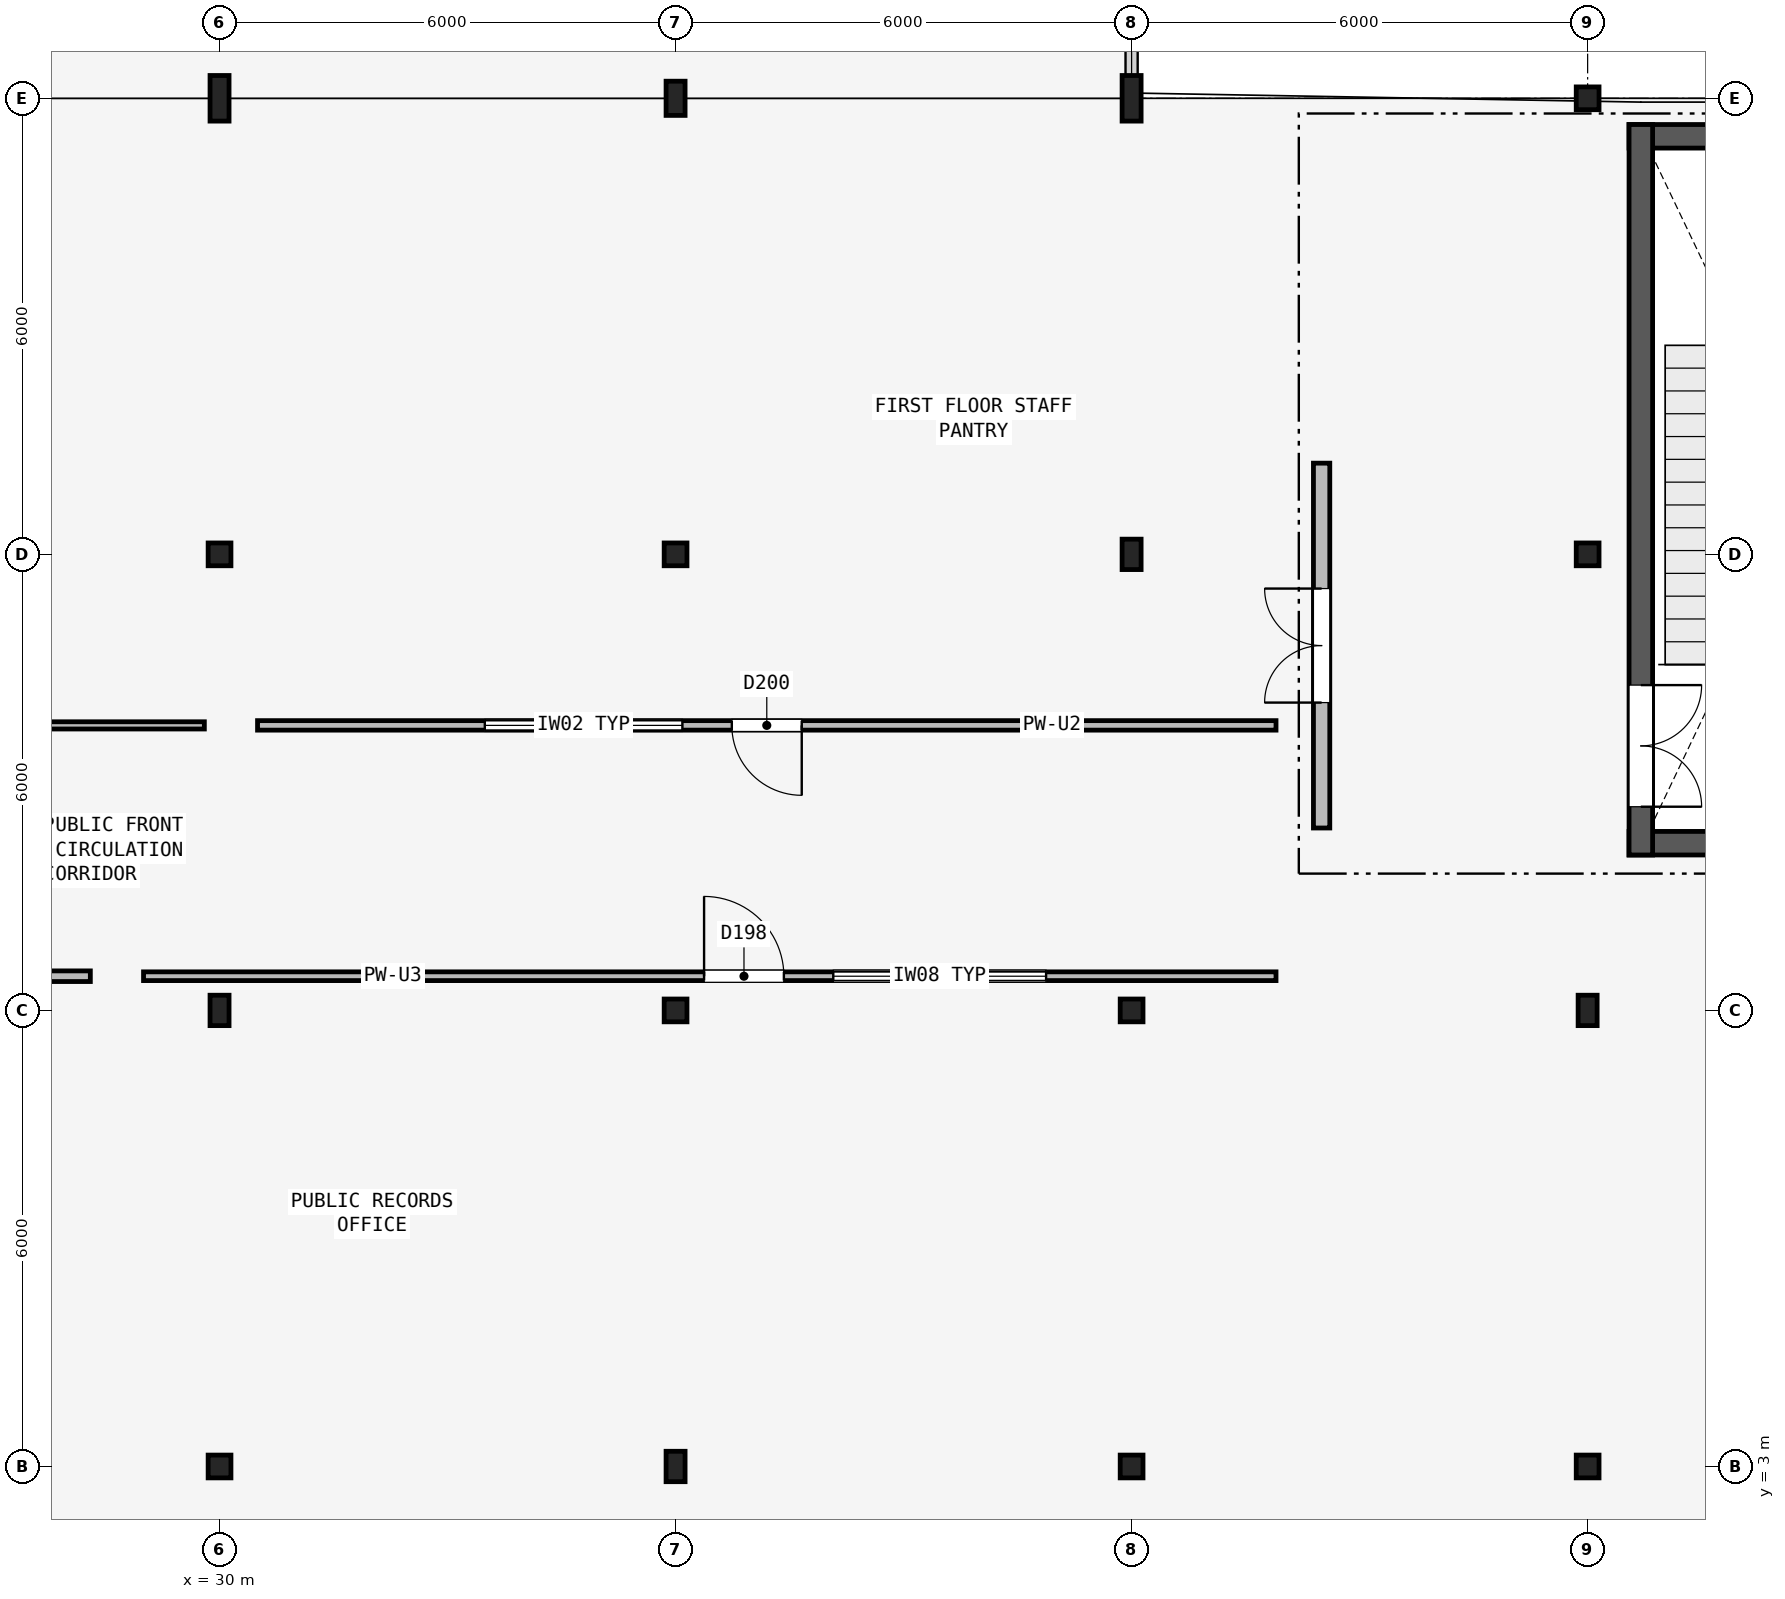
"""IFC4 building model, lengths in metres.
Left out: names, types, materials, properties, quantities, classifications, styles, units other than length and angle.
Written with IfcOpenShell. Run it as: python <this file> out.ifc"""

import sys

from ifc_helpers import new_model, si_unit, direction, frame, frame_2d, origin, origin_2d, place, context, subcontext, project, spatial, rectangle, hollow_rectangle, i_section, extrude, element, fill, save


model = new_model("IFC4")
c1 = context("Model", 3, precision=1e-05, world=origin(), true_north=direction((0.0, 1.0)))
c2 = subcontext(c1, "Body", "Model", "MODEL_VIEW")
j1 = project(units=[si_unit("LENGTHUNIT", "METRE"), si_unit("PLANEANGLEUNIT", "RADIAN")], contexts=[c1])
p1 = place(None, origin())
s1 = spatial("IfcSite", under=j1, at=p1, CompositionType="ELEMENT")
p2 = place(p1, origin())
s2 = spatial("IfcBuilding", under=s1, at=p2, CompositionType="ELEMENT")
p3 = place(p2, frame((0.0, 0.0, 4.8)))
s3 = spatial("IfcBuildingStorey", under=s2, at=p3, CompositionType="ELEMENT", Elevation=4.8)
p4 = place(p3, frame((30.0, 3.0, 0.0), z_axis=(0.0, 0.0, 1.0), x_axis=(1.0, 0.0, 0.0)))
e1 = element("IfcColumn", 1, at=p4, inside=s3, PredefinedType="COLUMN", context=c2, shape_type="SweptSolid", body=[
    extrude(hollow_rectangle(XDim=0.3, YDim=0.3, WallThickness=0.016, InnerFilletRadius=0.016, OuterFilletRadius=0.032, at=origin_2d()), origin(), (0.0, 0.0, 1.0), 4.5),
])
p5 = place(p3, frame((30.0, 9.0, 0.0), z_axis=(0.0, 0.0, 1.0), x_axis=(1.0, 0.0, 0.0)))
e2 = element("IfcColumn", 2, at=p5, inside=s3, PredefinedType="COLUMN", context=c2, shape_type="SweptSolid", body=[
    extrude(i_section(OverallWidth=0.25, OverallDepth=0.4, WebThickness=0.01, FlangeThickness=0.013, FilletRadius=0.014, at=origin_2d()), origin(), (0.0, 0.0, 1.0), 4.5),
])
p6 = place(p3, frame((30.0, 15.0, 0.0), z_axis=(0.0, 0.0, 1.0), x_axis=(1.0, 0.0, 0.0)))
e3 = element("IfcColumn", 3, at=p6, inside=s3, PredefinedType="COLUMN", context=c2, shape_type="SweptSolid", body=[
    extrude(hollow_rectangle(XDim=0.3, YDim=0.3, WallThickness=0.016, InnerFilletRadius=0.016, OuterFilletRadius=0.032, at=origin_2d()), origin(), (0.0, 0.0, 1.0), 4.5),
])
p7 = place(p3, frame((30.0, 21.0, 0.0), z_axis=(0.0, 0.0, 1.0), x_axis=(1.0, 0.0, 0.0)))
e4 = element("IfcColumn", 4, at=p7, inside=s3, PredefinedType="COLUMN", context=c2, shape_type="SweptSolid", body=[
    extrude(i_section(OverallWidth=0.25, OverallDepth=0.6, WebThickness=0.012, FlangeThickness=0.024, FilletRadius=0.017, at=origin_2d()), origin(), (0.0, 0.0, 1.0), 4.5),
])
p8 = place(p3, frame((36.0, 3.0, 0.0), z_axis=(0.0, 0.0, 1.0), x_axis=(1.0, 0.0, 0.0)))
e5 = element("IfcColumn", 5, at=p8, inside=s3, PredefinedType="COLUMN", context=c2, shape_type="SweptSolid", body=[
    extrude(i_section(OverallWidth=0.25, OverallDepth=0.4, WebThickness=0.01, FlangeThickness=0.013, FilletRadius=0.014, at=origin_2d()), origin(), (0.0, 0.0, 1.0), 4.5),
])
for number, where, z_axis, x_axis in (
    (6, (36.0, 9.0, 0.0), (0.0, 0.0, 1.0), (1.0, 0.0, 0.0)),
    (7, (36.0, 15.0, 0.0), (0.0, 0.0, 1.0), (1.0, 0.0, 0.0)),
):
    element("IfcColumn", number, at=place(p3, frame(where, z_axis=z_axis, x_axis=x_axis)), inside=s3, PredefinedType="COLUMN", context=c2, shape_type="SweptSolid", body=[
        extrude(hollow_rectangle(XDim=0.3, YDim=0.3, WallThickness=0.016, InnerFilletRadius=0.016, OuterFilletRadius=0.032, at=origin_2d()), origin(), (0.0, 0.0, 1.0), 4.5),
    ])
p9 = place(p3, frame((36.0, 21.0, 0.0), z_axis=(0.0, 0.0, 1.0), x_axis=(1.0, 0.0, 0.0)))
e8 = element("IfcColumn", 8, at=p9, inside=s3, PredefinedType="COLUMN", context=c2, shape_type="SweptSolid", body=[
    extrude(i_section(OverallWidth=0.25, OverallDepth=0.45, WebThickness=0.011, FlangeThickness=0.014, FilletRadius=0.015, at=origin_2d()), origin(), (0.0, 0.0, 1.0), 4.5),
])
for number, where, z_axis, x_axis in (
    (9, (42.0, 3.0, 0.0), (0.0, 0.0, 1.0), (1.0, 0.0, 0.0)),
    (10, (42.0, 9.0, 0.0), (0.0, 0.0, 1.0), (1.0, 0.0, 0.0)),
):
    element("IfcColumn", number, at=place(p3, frame(where, z_axis=z_axis, x_axis=x_axis)), inside=s3, PredefinedType="COLUMN", context=c2, shape_type="SweptSolid", body=[
        extrude(hollow_rectangle(XDim=0.3, YDim=0.3, WallThickness=0.016, InnerFilletRadius=0.016, OuterFilletRadius=0.032, at=origin_2d()), origin(), (0.0, 0.0, 1.0), 4.5),
    ])
p10 = place(p3, frame((42.0, 15.0, 0.0), z_axis=(0.0, 0.0, 1.0), x_axis=(1.0, 0.0, 0.0)))
e11 = element("IfcColumn", 11, at=p10, inside=s3, PredefinedType="COLUMN", context=c2, shape_type="SweptSolid", body=[
    extrude(i_section(OverallWidth=0.25, OverallDepth=0.4, WebThickness=0.01, FlangeThickness=0.013, FilletRadius=0.014, at=origin_2d()), origin(), (0.0, 0.0, 1.0), 4.5),
])
p11 = place(p3, frame((42.0, 21.0, 0.0), z_axis=(0.0, 0.0, 1.0), x_axis=(1.0, 0.0, 0.0)))
e12 = element("IfcColumn", 12, at=p11, inside=s3, PredefinedType="COLUMN", context=c2, shape_type="SweptSolid", body=[
    extrude(i_section(OverallWidth=0.25, OverallDepth=0.6, WebThickness=0.012, FlangeThickness=0.024, FilletRadius=0.017, at=origin_2d()), origin(), (0.0, 0.0, 1.0), 4.5),
])
p12 = place(p3, frame((48.0, 3.0, 0.0), z_axis=(0.0, 0.0, 1.0), x_axis=(1.0, 0.0, 0.0)))
e13 = element("IfcColumn", 13, at=p12, inside=s3, PredefinedType="COLUMN", context=c2, shape_type="SweptSolid", body=[
    extrude(hollow_rectangle(XDim=0.3, YDim=0.3, WallThickness=0.016, InnerFilletRadius=0.016, OuterFilletRadius=0.032, at=origin_2d()), origin(), (0.0, 0.0, 1.0), 4.5),
])
p13 = place(p3, frame((48.0, 9.0, 0.0), z_axis=(0.0, 0.0, 1.0), x_axis=(1.0, 0.0, 0.0)))
e14 = element("IfcColumn", 14, at=p13, inside=s3, PredefinedType="COLUMN", context=c2, shape_type="SweptSolid", body=[
    extrude(i_section(OverallWidth=0.25, OverallDepth=0.4, WebThickness=0.01, FlangeThickness=0.013, FilletRadius=0.014, at=origin_2d()), origin(), (0.0, 0.0, 1.0), 4.5),
])
for number, where, z_axis, x_axis in (
    (15, (48.0, 15.0, 0.0), (0.0, 0.0, 1.0), (1.0, 0.0, 0.0)),
    (16, (48.0, 21.0, 0.0), (0.0, 0.0, 1.0), (1.0, 0.0, 0.0)),
):
    element("IfcColumn", number, at=place(p3, frame(where, z_axis=z_axis, x_axis=x_axis)), inside=s3, PredefinedType="COLUMN", context=c2, shape_type="SweptSolid", body=[
        extrude(hollow_rectangle(XDim=0.3, YDim=0.3, WallThickness=0.016, InnerFilletRadius=0.016, OuterFilletRadius=0.032, at=origin_2d()), origin(), (0.0, 0.0, 1.0), 4.5),
    ])
p14 = place(p3, frame((49.329, 2.022, 0.0), z_axis=(0.0, 0.0, 1.0), x_axis=(0.960269600698, 0.279073993728, 0.0)))
e17 = element("IfcWall", 17, at=p14, inside=s3, PredefinedType="SOLIDWALL", context=c2, shape_type="SweptSolid", body=[
    extrude(rectangle(XDim=2.45, YDim=0.3, at=frame_2d((1.225, 0.0))), origin(), (0.0, 0.0, 1.0), 3.55),
])
for number, where, z_axis, x_axis in (
    (18, (48.545, 11.2, 0.0), (0.0, 0.0, 1.0), (1.0, 0.0, 0.0)),
    (19, (53.355, 20.5, 0.0), (0.0, 0.0, 1.0), (-1.0, 0.0, 0.0)),
):
    element("IfcWall", number, at=place(p3, frame(where, z_axis=z_axis, x_axis=x_axis)), inside=s3, PredefinedType="SHEAR", context=c2, shape_type="SweptSolid", body=[
        extrude(rectangle(XDim=4.81, YDim=0.31, at=frame_2d((2.405, 0.0))), origin(), (0.0, 0.0, 1.0), 4.36),
    ])
p15 = place(p3, frame((48.7, 20.655, 0.0), z_axis=(0.0, 0.0, 1.0), x_axis=(0.0, -1.0, 0.0)))
e20 = element("IfcWall", 20, at=p15, inside=s3, PredefinedType="SHEAR", context=c2, shape_type="SweptSolid", body=[
    extrude(rectangle(XDim=9.61, YDim=0.31, at=frame_2d((4.805, 0.0))), origin(), (0.0, 0.0, 1.0), 4.36),
])
p16 = place(p15, frame((7.375, 0.0, 0.0)))
e21 = element("IfcOpeningElement", 21, at=p16, cuts=e20, PredefinedType="OPENING", context=c2, shape_type="SweptSolid", body=[
    extrude(rectangle(XDim=1.6, YDim=2.2, at=frame_2d((0.8, 1.1))), frame((0.0, 0.165, 0.0), z_axis=(0.0, -1.0, 0.0), x_axis=(1.0, 0.0, 0.0)), (0.0, 0.0, 1.0), 0.33),
])
p17 = place(p3, frame((44.5, 11.4, 0.0), z_axis=(0.0, 0.0, 1.0), x_axis=(0.0, 1.0, 0.0)))
e22 = element("IfcWall", 22, at=p17, inside=s3, PredefinedType="PARTITIONING", context=c2, shape_type="SweptSolid", body=[
    extrude(rectangle(XDim=4.8, YDim=0.215, at=frame_2d((2.4, 0.0))), origin(), (0.0, 0.0, 1.0), 3.64),
])
p18 = place(p17, frame((1.65, 0.0, 0.0)))
e23 = element("IfcOpeningElement", 23, at=p18, cuts=e22, PredefinedType="OPENING", context=c2, shape_type="SweptSolid", body=[
    extrude(rectangle(XDim=1.5, YDim=2.15, at=frame_2d((0.75, 1.075))), frame((0.0, 0.117, 0.0), z_axis=(0.0, -1.0, 0.0), x_axis=(1.0, 0.0, 0.0)), (0.0, 0.0, 1.0), 0.235),
])
p19 = place(p3, frame((4.7, 9.45, 0.0), z_axis=(0.0, 0.0, 1.0), x_axis=(1.0, 0.0, 0.0)))
e24 = element("IfcWall", 24, at=p19, inside=s3, PredefinedType="PARTITIONING", context=c2, shape_type="SweptSolid", body=[
    extrude(rectangle(XDim=23.6, YDim=0.14, at=frame_2d((11.8, 0.0))), origin(), (0.0, 0.0, 1.0), 3.783),
])
p20 = place(p19, frame((11.325, 0.0, 0.0)))
e25 = element("IfcOpeningElement", 25, at=p20, cuts=e24, PredefinedType="OPENING", context=c2, shape_type="SweptSolid", body=[
    extrude(rectangle(XDim=0.95, YDim=2.15, at=frame_2d((0.475, 1.075))), frame((0.0, 0.08, 0.0), z_axis=(0.0, -1.0, 0.0), x_axis=(1.0, 0.0, 0.0)), (0.0, 0.0, 1.0), 0.16),
])
p21 = place(p3, frame((29.0, 9.45, 0.0), z_axis=(0.0, 0.0, 1.0), x_axis=(1.0, 0.0, 0.0)))
e26 = element("IfcWall", 26, at=p21, inside=s3, PredefinedType="PARTITIONING", context=c2, shape_type="SweptSolid", body=[
    extrude(rectangle(XDim=14.9, YDim=0.115, at=frame_2d((7.45, 0.0))), origin(), (0.0, 0.0, 1.0), 3.783),
])
p22 = place(p21, frame((7.375, 0.0, 0.0)))
e27 = element("IfcOpeningElement", 27, at=p22, cuts=e26, PredefinedType="OPENING", context=c2, shape_type="SweptSolid", body=[
    extrude(rectangle(XDim=1.05, YDim=2.2, at=frame_2d((0.525, 1.1))), frame((0.0, 0.067, 0.0), z_axis=(0.0, -1.0, 0.0), x_axis=(1.0, 0.0, 0.0)), (0.0, 0.0, 1.0), 0.135),
])
p23 = place(p21, frame((9.075, 0.0, 0.9)))
e28 = element("IfcOpeningElement", 28, at=p23, cuts=e26, PredefinedType="OPENING", context=c2, shape_type="SweptSolid", body=[
    extrude(rectangle(XDim=2.8, YDim=1.5, at=frame_2d((1.4, 0.75))), frame((0.0, 0.067, 0.0), z_axis=(0.0, -1.0, 0.0), x_axis=(1.0, 0.0, 0.0)), (0.0, 0.0, 1.0), 0.135),
])
p24 = place(p3, frame((29.8, 12.75, 0.0), z_axis=(0.0, 0.0, 1.0), x_axis=(-1.0, 0.0, 0.0)))
e29 = element("IfcWall", 29, at=p24, inside=s3, PredefinedType="PARTITIONING", context=c2, shape_type="SweptSolid", body=[
    extrude(rectangle(XDim=25.1, YDim=0.095, at=frame_2d((12.55, 0.0))), origin(), (0.0, 0.0, 1.0), 3.783),
])
p25 = place(p24, frame((12.05, 0.0, 0.0)))
e30 = element("IfcOpeningElement", 30, at=p25, cuts=e29, PredefinedType="OPENING", context=c2, shape_type="SweptSolid", body=[
    extrude(rectangle(XDim=1.0, YDim=2.15, at=frame_2d((0.5, 1.075))), frame((0.0, 0.057, 0.0), z_axis=(0.0, -1.0, 0.0), x_axis=(1.0, 0.0, 0.0)), (0.0, 0.0, 1.0), 0.115),
])
p26 = place(p24, frame((13.7, 0.0, 1.0)))
e31 = element("IfcOpeningElement", 31, at=p26, cuts=e29, PredefinedType="OPENING", context=c2, shape_type="SweptSolid", body=[
    extrude(rectangle(XDim=2.0, YDim=1.2, at=frame_2d((1.0, 0.6))), frame((0.0, 0.057, 0.0), z_axis=(0.0, -1.0, 0.0), x_axis=(1.0, 0.0, 0.0)), (0.0, 0.0, 1.0), 0.115),
])
p27 = place(p3, frame((43.9, 12.75, 0.0), z_axis=(0.0, 0.0, 1.0), x_axis=(-1.0, 0.0, 0.0)))
e32 = element("IfcWall", 32, at=p27, inside=s3, PredefinedType="PARTITIONING", context=c2, shape_type="SweptSolid", body=[
    extrude(rectangle(XDim=13.4, YDim=0.125, at=frame_2d((6.7, 0.0))), origin(), (0.0, 0.0, 1.0), 3.783),
])
p28 = place(p27, frame((6.24, 0.0, 0.0)))
e33 = element("IfcOpeningElement", 33, at=p28, cuts=e32, PredefinedType="OPENING", context=c2, shape_type="SweptSolid", body=[
    extrude(rectangle(XDim=0.92, YDim=2.1, at=frame_2d((0.46, 1.05))), frame((0.0, 0.073, 0.0), z_axis=(0.0, -1.0, 0.0), x_axis=(1.0, 0.0, 0.0)), (0.0, 0.0, 1.0), 0.145),
])
p29 = place(p27, frame((7.81, 0.0, 1.0)))
e34 = element("IfcOpeningElement", 34, at=p29, cuts=e32, PredefinedType="OPENING", context=c2, shape_type="SweptSolid", body=[
    extrude(rectangle(XDim=2.6, YDim=1.2, at=frame_2d((1.3, 0.6))), frame((0.0, 0.073, 0.0), z_axis=(0.0, -1.0, 0.0), x_axis=(1.0, 0.0, 0.0)), (0.0, 0.0, 1.0), 0.145),
])
p30 = place(p16, origin())
e35 = element("IfcDoor", 35, at=p30, inside=s3, OperationType="DOUBLE_DOOR_SINGLE_SWING", PredefinedType="DOOR", context=c2, shape_type="SweptSolid", body=[
    extrude(rectangle(XDim=1.6, YDim=2.2, at=frame_2d((0.8, 1.1))), frame((0.0, 0.025, 0.0), z_axis=(0.0, -1.0, 0.0), x_axis=(1.0, 0.0, 0.0)), (0.0, 0.0, 1.0), 0.05),
])
fill(e21, e35)
p31 = place(p18, origin())
e36 = element("IfcDoor", 36, at=p31, inside=s3, OperationType="DOUBLE_DOOR_SINGLE_SWING", PredefinedType="DOOR", context=c2, shape_type="SweptSolid", body=[
    extrude(rectangle(XDim=1.5, YDim=2.15, at=frame_2d((0.75, 1.075))), frame((0.0, 0.025, 0.0), z_axis=(0.0, -1.0, 0.0), x_axis=(1.0, 0.0, 0.0)), (0.0, 0.0, 1.0), 0.05),
])
fill(e23, e36)
p32 = place(p22, origin())
e37 = element("IfcDoor", 37, at=p32, inside=s3, OperationType="SINGLE_SWING_LEFT", PredefinedType="DOOR", context=c2, shape_type="SweptSolid", body=[
    extrude(rectangle(XDim=1.05, YDim=2.2, at=frame_2d((0.525, 1.1))), frame((0.0, 0.025, 0.0), z_axis=(0.0, -1.0, 0.0), x_axis=(1.0, 0.0, 0.0)), (0.0, 0.0, 1.0), 0.05),
])
fill(e27, e37)
p33 = place(p23, origin())
e38 = element("IfcWindow", 38, at=p33, inside=s3, PartitioningType="SINGLE_PANEL", PredefinedType="WINDOW", context=c2, shape_type="SweptSolid", body=[
    extrude(rectangle(XDim=2.8, YDim=1.5, at=frame_2d((1.4, 0.75))), frame((0.0, 0.03, 0.0), z_axis=(0.0, -1.0, 0.0), x_axis=(1.0, 0.0, 0.0)), (0.0, 0.0, 1.0), 0.06),
])
fill(e28, e38)
p34 = place(p28, origin())
e39 = element("IfcDoor", 39, at=p34, inside=s3, OperationType="SINGLE_SWING_LEFT", PredefinedType="DOOR", context=c2, shape_type="SweptSolid", body=[
    extrude(rectangle(XDim=0.92, YDim=2.1, at=frame_2d((0.46, 1.05))), frame((0.0, 0.025, 0.0), z_axis=(0.0, -1.0, 0.0), x_axis=(1.0, 0.0, 0.0)), (0.0, 0.0, 1.0), 0.05),
])
fill(e33, e39)
p35 = place(p29, origin())
e40 = element("IfcWindow", 40, at=p35, inside=s3, PartitioningType="SINGLE_PANEL", PredefinedType="WINDOW", context=c2, shape_type="SweptSolid", body=[
    extrude(rectangle(XDim=2.6, YDim=1.2, at=frame_2d((1.3, 0.6))), frame((0.0, 0.03, 0.0), z_axis=(0.0, -1.0, 0.0), x_axis=(1.0, 0.0, 0.0)), (0.0, 0.0, 1.0), 0.06),
])
fill(e34, e40)
save(model, sys.argv[1])
